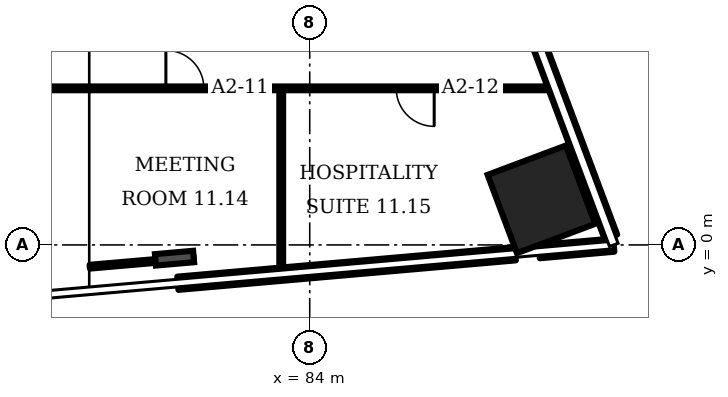
"""IFC4 building model, lengths in metres.
Left out: names, types, materials, properties, quantities, classifications, styles, units other than length and angle.
Written with IfcOpenShell. Run it as: python <this file> out.ifc"""

import sys

from ifc_helpers import new_model, si_unit, direction, frame, frame_2d, origin, origin_2d, place, context, subcontext, project, spatial, rectangle, i_section, extrude, element, fill, save


model = new_model("IFC4")
c1 = context("Model", 3, precision=1e-05, world=origin(), true_north=direction((0.0, 1.0)))
c2 = subcontext(c1, "Body", "Model", "MODEL_VIEW")
j1 = project(units=[si_unit("LENGTHUNIT", "METRE"), si_unit("PLANEANGLEUNIT", "RADIAN")], contexts=[c1])
p1 = place(None, origin())
s1 = spatial("IfcSite", under=j1, at=p1, CompositionType="ELEMENT")
p2 = place(p1, origin())
s2 = spatial("IfcBuilding", under=s1, at=p2, CompositionType="ELEMENT")
p3 = place(p2, frame((0.0, 0.0, 59.5)))
s3 = spatial("IfcBuildingStorey", under=s2, at=p3, CompositionType="ELEMENT", Elevation=59.5)
p4 = place(p3, frame((90.096, 1.2, 0.0), z_axis=(0.0, 0.0, 1.0), x_axis=(-0.351123, 0.936328, 0.0)))
e1 = element("IfcColumn", 1, at=p4, inside=s3, PredefinedType="COLUMN", context=c2, shape_type="SweptSolid", body=[
    extrude(rectangle(XDim=2.2, YDim=2.2, at=origin_2d()), origin(), (0.0, 0.0, 1.0), 3.6),
])
p5 = place(p3, frame((80.442, -0.349, 0.0), z_axis=(0.0, 0.0, 1.0), x_axis=(0.087156, -0.996198, 0.0)))
e2 = element("IfcColumn", 2, at=p5, inside=s3, PredefinedType="COLUMN", context=c2, shape_type="SweptSolid", body=[
    extrude(i_section(OverallWidth=0.302, OverallDepth=1.008, WebThickness=0.021, FlangeThickness=0.04, FilletRadius=0.03, at=origin_2d()), origin(), (0.0, 0.0, 1.0), 3.6),
])
p6 = place(p3, frame((80.53, -1.009, 0.0), z_axis=(0.0, 0.0, 1.0), x_axis=(0.996198, 0.087169, 0.0)))
e3 = element("IfcWall", 3, at=p6, inside=s3, PredefinedType="SOLIDWALL", context=c2, shape_type="SweptSolid", body=[
    extrude(rectangle(XDim=8.912, YDim=0.35, at=frame_2d((4.456, 0.0))), origin(), (0.0, 0.0, 1.0), 1.0),
])
p7 = place(p3, frame((90.039, -0.177, 0.0), z_axis=(0.0, 0.0, 1.0), x_axis=(0.996193, 0.08717, 0.0)))
e4 = element("IfcWall", 4, at=p7, inside=s3, PredefinedType="SOLIDWALL", context=c2, shape_type="SweptSolid", body=[
    extrude(rectangle(XDim=1.969, YDim=0.35, at=frame_2d((0.984, 0.0))), origin(), (0.0, 0.0, 1.0), 1.0),
])
p8 = place(p3, frame((91.926, 0.211, 0.0), z_axis=(0.0, 0.0, 1.0), x_axis=(-0.351118, 0.936328, 0.0)))
e5 = element("IfcWall", 5, at=p8, inside=s3, PredefinedType="SOLIDWALL", context=c2, shape_type="SweptSolid", body=[
    extrude(rectangle(XDim=6.154, YDim=0.35, at=frame_2d((3.077, 0.0))), origin(), (0.0, 0.0, 1.0), 1.0),
])
p9 = place(p3, frame((76.867, 4.12, 0.0), z_axis=(0.0, 0.0, 1.0), x_axis=(1.0, 0.0, 0.0)))
e6 = element("IfcWall", 6, at=p9, inside=s3, PredefinedType="PARTITIONING", context=c2, shape_type="SweptSolid", body=[
    extrude(rectangle(XDim=13.566, YDim=0.1, at=frame_2d((6.783, 0.0))), origin(), (0.0, 0.0, 1.0), 2.58),
])
p10 = place(p9, frame((3.347, 0.0, 0.0)))
e7 = element("IfcOpeningElement", 7, at=p10, cuts=e6, PredefinedType="OPENING", context=c2, shape_type="SweptSolid", body=[
    extrude(rectangle(XDim=1.0, YDim=2.1, at=frame_2d((0.5, 1.05))), frame((0.0, 0.06, 0.0), z_axis=(0.0, -1.0, 0.0), x_axis=(1.0, 0.0, 0.0)), (0.0, 0.0, 1.0), 0.12),
])
p11 = place(p9, frame((9.407, 0.0, 0.0)))
e8 = element("IfcOpeningElement", 8, at=p11, cuts=e6, PredefinedType="OPENING", context=c2, shape_type="SweptSolid", body=[
    extrude(rectangle(XDim=1.0, YDim=2.1, at=frame_2d((0.5, 1.05))), frame((0.0, 0.06, 0.0), z_axis=(0.0, -1.0, 0.0), x_axis=(1.0, 0.0, 0.0)), (0.0, 0.0, 1.0), 0.12),
])
p12 = place(p3, frame((78.212, -0.573, 0.0), z_axis=(0.0, 0.0, 1.0), x_axis=(0.996224, 0.086779, 0.0)))
e9 = element("IfcWall", 9, at=p12, inside=s3, PredefinedType="PARTITIONING", context=c2, shape_type="SweptSolid", body=[
    extrude(rectangle(XDim=2.743, YDim=0.1, at=frame_2d((1.372, 0.0))), origin(), (0.0, 0.0, 1.0), 2.58),
])
p13 = place(p3, frame((83.25, -0.745, 0.0), z_axis=(0.0, 0.0, 1.0), x_axis=(0.0, 1.0, 0.0)))
e10 = element("IfcWall", 10, at=p13, inside=s3, PredefinedType="PARTITIONING", context=c2, shape_type="SweptSolid", body=[
    extrude(rectangle(XDim=4.865, YDim=0.1, at=frame_2d((2.433, 0.0))), origin(), (0.0, 0.0, 1.0), 2.58),
])
p14 = place(p10, origin())
e11 = element("IfcDoor", 11, at=p14, inside=s3, OperationType="SINGLE_SWING_LEFT", PredefinedType="DOOR", context=c2, shape_type="SweptSolid", body=[
    extrude(rectangle(XDim=1.0, YDim=2.1, at=frame_2d((0.5, 1.05))), frame((0.0, 0.025, 0.0), z_axis=(0.0, -1.0, 0.0), x_axis=(1.0, 0.0, 0.0)), (0.0, 0.0, 1.0), 0.05),
])
fill(e7, e11)
p15 = place(p11, origin())
e12 = element("IfcDoor", 12, at=p15, inside=s3, OperationType="SINGLE_SWING_RIGHT", PredefinedType="DOOR", context=c2, shape_type="SweptSolid", body=[
    extrude(rectangle(XDim=1.0, YDim=2.1, at=frame_2d((0.5, 1.05))), frame((0.0, 0.025, 0.0), z_axis=(0.0, -1.0, 0.0), x_axis=(1.0, 0.0, 0.0)), (0.0, 0.0, 1.0), 0.05),
])
fill(e8, e12)
save(model, sys.argv[1])
